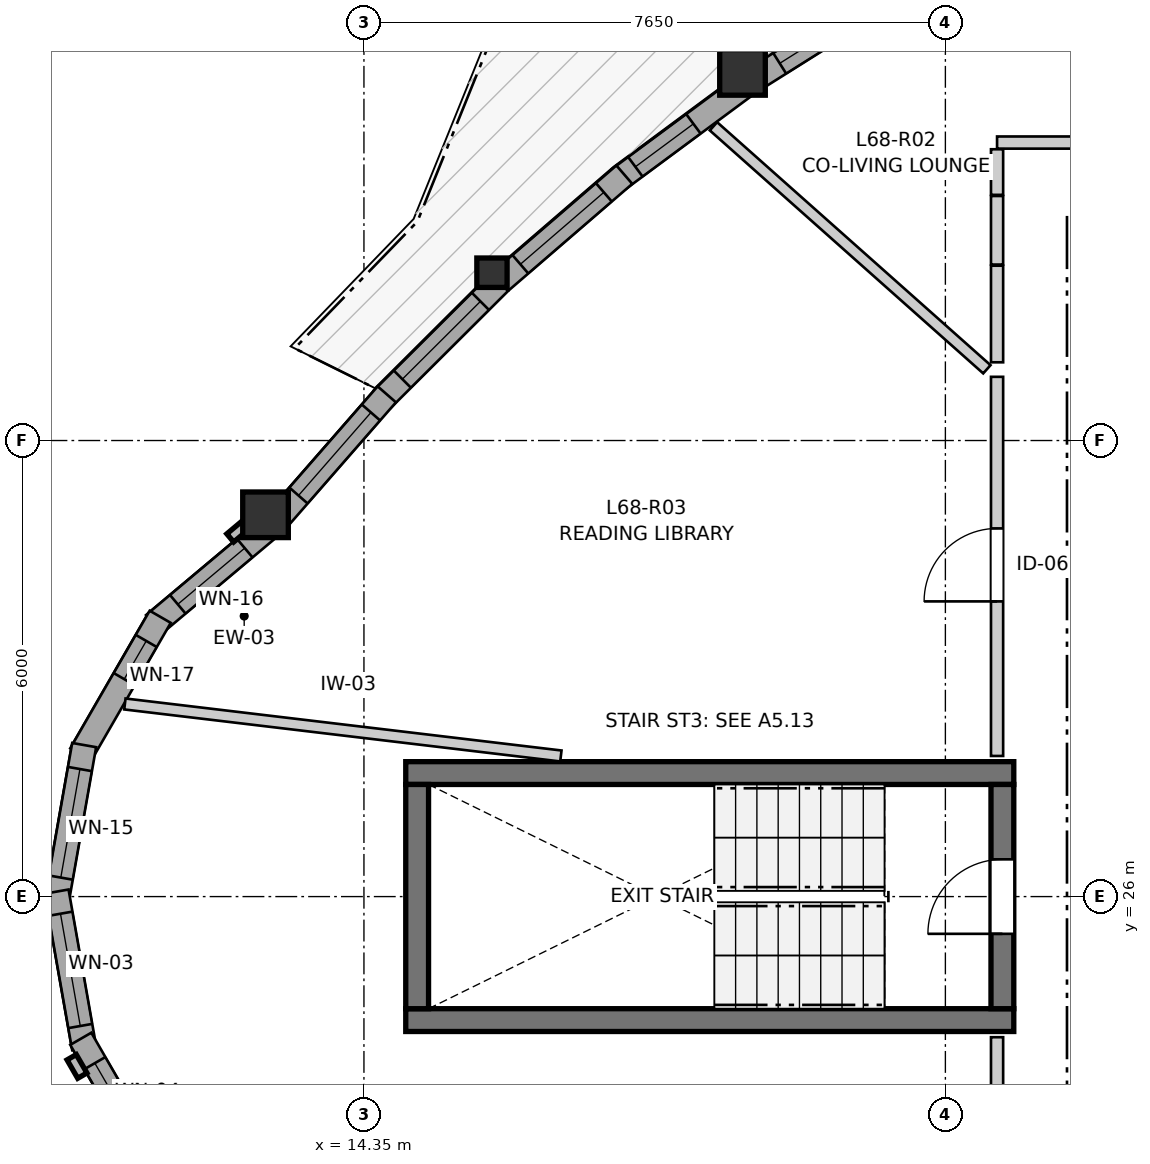
"""IFC4 building model, lengths in metres.
Left out: names, types, materials, properties, quantities, classifications, styles, units other than length and angle.
Written with IfcOpenShell. Run it as: python <this file> out.ifc"""

import sys

from ifc_helpers import new_model, si_unit, direction, frame, frame_2d, origin, origin_2d, place, context, subcontext, project, spatial, rectangle, i_section, extrude, source, transform, mapped, element, fill, save


model = new_model("IFC4")
c1 = context("Model", 3, precision=1e-05, world=origin(), true_north=direction((0.0, 1.0)))
c2 = subcontext(c1, "Body", "Model", "MODEL_VIEW")
j1 = project(units=[si_unit("LENGTHUNIT", "METRE"), si_unit("PLANEANGLEUNIT", "RADIAN")], contexts=[c1])
p1 = place(None, origin())
s1 = spatial("IfcSite", under=j1, at=p1, CompositionType="ELEMENT")
p2 = place(p1, origin())
s2 = spatial("IfcBuilding", under=s1, at=p2, CompositionType="ELEMENT")
p3 = place(p2, frame((0.0, 0.0, 227.6)))
s3 = spatial("IfcBuildingStorey", under=s2, at=p3, CompositionType="ELEMENT", Elevation=227.6)
for number, where, z_axis, x_axis in (
    (1, (14.9, 24.375, 0.0), (0.0, 0.0, 1.0), (1.0, 0.0, 0.0)),
    (2, (22.9, 27.625, 0.0), (0.0, 0.0, 1.0), (-1.0, 0.0, 0.0)),
):
    element("IfcWall", number, at=place(p3, frame(where, z_axis=z_axis, x_axis=x_axis)), inside=s3, PredefinedType="SHEAR", context=c2, shape_type="SweptSolid", body=[
        extrude(rectangle(XDim=8.0, YDim=0.3, at=frame_2d((4.0, 0.0))), origin(), (0.0, 0.0, 1.0), 2.96),
    ])
p4 = place(p3, frame((15.05, 27.475, 0.0), z_axis=(0.0, 0.0, 1.0), x_axis=(0.0, -1.0, 0.0)))
e3 = element("IfcWall", 3, at=p4, inside=s3, PredefinedType="SHEAR", context=c2, shape_type="SweptSolid", body=[
    extrude(rectangle(XDim=2.95, YDim=0.3, at=frame_2d((1.475, 0.0))), origin(), (0.0, 0.0, 1.0), 2.96),
])
p5 = place(p3, frame((22.75, 24.525, 0.0), z_axis=(0.0, 0.0, 1.0), x_axis=(0.0, 1.0, 0.0)))
e4 = element("IfcWall", 4, at=p5, inside=s3, PredefinedType="SHEAR", context=c2, shape_type="SweptSolid", body=[
    extrude(rectangle(XDim=2.95, YDim=0.3, at=frame_2d((1.475, 0.0))), origin(), (0.0, 0.0, 1.0), 2.96),
])
p6 = place(p5, frame((0.985, 0.0, 0.0)))
e5 = element("IfcOpeningElement", 5, at=p6, cuts=e4, PredefinedType="OPENING", context=c2, shape_type="SweptSolid", body=[
    extrude(rectangle(XDim=0.98, YDim=2.15, at=frame_2d((0.49, 1.075))), frame((0.0, 0.16, 0.0), z_axis=(0.0, -1.0, 0.0), x_axis=(1.0, 0.0, 0.0)), (0.0, 0.0, 1.0), 0.32),
])
m1 = source(origin(), c2, "Body", "SweptSolid", [
    extrude(rectangle(XDim=0.6, YDim=0.6, at=origin_2d()), origin(), (0.0, 0.0, 1.0), 2.96),
])
for number, where, z_axis, x_axis in (
    (6, (13.055, 31.023, 0.0), (0.0, 0.0, 1.0), (1.0, 0.0, 0.0)),
    (7, (19.331, 36.843, 0.0), (0.0, 0.0, 1.0), (1.0, 0.0, 0.0)),
):
    element("IfcColumn", number, at=place(p3, frame(where, z_axis=z_axis, x_axis=x_axis)), inside=s3, PredefinedType="COLUMN", context=c2, shape_type="MappedRepresentation", body=[
        mapped(m1, transform((0.0, 0.0, 0.0), x_axis=(1.0, 0.0, 0.0), y_axis=(0.0, 1.0, 0.0), z_axis=(0.0, 0.0, 1.0), scale=1.0)),
    ])
m2 = source(origin(), c2, "Body", "SweptSolid", [
    extrude(i_section(OverallWidth=0.398, OverallDepth=0.387, WebThickness=0.019, FlangeThickness=0.03, FilletRadius=0.015, at=origin_2d()), origin(), (0.0, 0.0, 1.0), 2.96),
])
p7 = place(p3, frame((16.034, 34.208, 0.0), z_axis=(0.0, 0.0, 1.0), x_axis=(1.0, 0.0, 0.0)))
e8 = element("IfcColumn", 8, at=p7, inside=s3, PredefinedType="PILASTER", context=c2, shape_type="MappedRepresentation", body=[
    mapped(m2, transform((0.0, 0.0, 0.0), x_axis=(1.0, 0.0, 0.0), y_axis=(0.0, 1.0, 0.0), z_axis=(0.0, 0.0, 1.0), scale=1.0)),
])
p8 = place(p3, frame((13.089, 30.843, 0.0), z_axis=(0.0, 0.0, 1.0), x_axis=(-0.76606505432, -0.642763045414, 0.0)))
e9 = element("IfcWall", 9, at=p8, inside=s3, PredefinedType="SOLIDWALL", context=c2, shape_type="SweptSolid", body=[
    extrude(rectangle(XDim=1.962, YDim=0.32, at=frame_2d((0.981, 0.0))), origin(), (0.0, 0.0, 1.0), 2.58),
])
p9 = place(p8, frame((0.401, 0.0, 0.82)))
e10 = element("IfcOpeningElement", 10, at=p9, cuts=e9, PredefinedType="OPENING", context=c2, shape_type="SweptSolid", body=[
    extrude(rectangle(XDim=1.15, YDim=1.2, at=frame_2d((0.575, 0.6))), frame((0.0, 0.17, 0.0), z_axis=(0.0, -1.0, 0.0), x_axis=(1.0, 0.0, 0.0)), (0.0, 0.0, 1.0), 0.34),
])
p10 = place(p3, frame((11.669, 29.681, 0.0), z_axis=(0.0, 0.0, 1.0), x_axis=(-0.49990781971, -0.866078617559, 0.0)))
e11 = element("IfcWall", 11, at=p10, inside=s3, PredefinedType="SOLIDWALL", context=c2, shape_type="SweptSolid", body=[
    extrude(rectangle(XDim=2.09, YDim=0.32, at=frame_2d((1.045, 0.0))), origin(), (0.0, 0.0, 1.0), 2.58),
])
p11 = place(p10, frame((0.367, 0.0, 0.82)))
e12 = element("IfcOpeningElement", 12, at=p11, cuts=e11, PredefinedType="OPENING", context=c2, shape_type="SweptSolid", body=[
    extrude(rectangle(XDim=0.58, YDim=1.35, at=frame_2d((0.29, 0.675))), frame((0.0, 0.17, 0.0), z_axis=(0.0, -1.0, 0.0), x_axis=(1.0, 0.0, 0.0)), (0.0, 0.0, 1.0), 0.34),
])
p12 = place(p3, frame((10.669, 27.993, 0.0), z_axis=(0.0, 0.0, 1.0), x_axis=(-0.173672066494, -0.984803540469, 0.0)))
e13 = element("IfcWall", 13, at=p12, inside=s3, PredefinedType="SOLIDWALL", context=c2, shape_type="SweptSolid", body=[
    extrude(rectangle(XDim=2.09, YDim=0.32, at=frame_2d((1.045, 0.0))), origin(), (0.0, 0.0, 1.0), 2.58),
])
p13 = place(p12, frame((0.32, 0.0, 0.82)))
e14 = element("IfcOpeningElement", 14, at=p13, cuts=e13, PredefinedType="OPENING", context=c2, shape_type="SweptSolid", body=[
    extrude(rectangle(XDim=1.45, YDim=1.25, at=frame_2d((0.725, 0.625))), frame((0.0, 0.17, 0.0), z_axis=(0.0, -1.0, 0.0), x_axis=(1.0, 0.0, 0.0)), (0.0, 0.0, 1.0), 0.34),
])
p14 = place(p3, frame((10.306, 26.065, 0.0), z_axis=(0.0, 0.0, 1.0), x_axis=(0.173672066494, -0.984803540469, 0.0)))
e15 = element("IfcWall", 15, at=p14, inside=s3, PredefinedType="SOLIDWALL", context=c2, shape_type="SweptSolid", body=[
    extrude(rectangle(XDim=2.09, YDim=0.32, at=frame_2d((1.045, 0.0))), origin(), (0.0, 0.0, 1.0), 2.58),
])
p15 = place(p14, frame((0.295, 0.0, 0.82)))
e16 = element("IfcOpeningElement", 16, at=p15, cuts=e15, PredefinedType="OPENING", context=c2, shape_type="SweptSolid", body=[
    extrude(rectangle(XDim=1.5, YDim=1.45, at=frame_2d((0.75, 0.725))), frame((0.0, 0.17, 0.0), z_axis=(0.0, -1.0, 0.0), x_axis=(1.0, 0.0, 0.0)), (0.0, 0.0, 1.0), 0.34),
])
p16 = place(p3, frame((10.625, 24.129, 0.0), z_axis=(0.0, 0.0, 1.0), x_axis=(0.49990781971, -0.866078617559, 0.0)))
e17 = element("IfcWall", 17, at=p16, inside=s3, PredefinedType="SOLIDWALL", context=c2, shape_type="SweptSolid", body=[
    extrude(rectangle(XDim=2.09, YDim=0.32, at=frame_2d((1.045, 0.0))), origin(), (0.0, 0.0, 1.0), 2.58),
])
p17 = place(p16, frame((0.37, 0.0, 0.82)))
e18 = element("IfcOpeningElement", 18, at=p17, cuts=e17, PredefinedType="OPENING", context=c2, shape_type="SweptSolid", body=[
    extrude(rectangle(XDim=1.35, YDim=1.45, at=frame_2d((0.675, 0.725))), frame((0.0, 0.17, 0.0), z_axis=(0.0, -1.0, 0.0), x_axis=(1.0, 0.0, 0.0)), (0.0, 0.0, 1.0), 0.34),
])
p18 = place(p3, frame((21.215, 37.84, 0.0), z_axis=(0.0, 0.0, 1.0), x_axis=(-0.846356989859, -0.532616039672, 0.0)))
e19 = element("IfcWall", 19, at=p18, inside=s3, PredefinedType="SOLIDWALL", context=c2, shape_type="SweptSolid", body=[
    extrude(rectangle(XDim=2.036, YDim=0.32, at=frame_2d((1.018, 0.0))), origin(), (0.0, 0.0, 1.0), 2.58),
])
p19 = place(p18, frame((0.398, 0.0, 0.82)))
e20 = element("IfcOpeningElement", 20, at=p19, cuts=e19, PredefinedType="OPENING", context=c2, shape_type="SweptSolid", body=[
    extrude(rectangle(XDim=1.25, YDim=1.35, at=frame_2d((0.625, 0.675))), frame((0.0, 0.17, 0.0), z_axis=(0.0, -1.0, 0.0), x_axis=(1.0, 0.0, 0.0)), (0.0, 0.0, 1.0), 0.34),
])
p20 = place(p3, frame((19.354, 36.661, 0.0), z_axis=(0.0, 0.0, 1.0), x_axis=(-0.803846460046, -0.59483684206, 0.0)))
e21 = element("IfcWall", 21, at=p20, inside=s3, PredefinedType="SOLIDWALL", context=c2, shape_type="SweptSolid", body=[
    extrude(rectangle(XDim=2.048, YDim=0.32, at=frame_2d((1.024, 0.0))), origin(), (0.0, 0.0, 1.0), 2.58),
])
p21 = place(p20, frame((0.832, 0.0, 0.82)))
e22 = element("IfcOpeningElement", 22, at=p21, cuts=e21, PredefinedType="OPENING", context=c2, shape_type="SweptSolid", body=[
    extrude(rectangle(XDim=0.95, YDim=1.35, at=frame_2d((0.475, 0.675))), frame((0.0, 0.17, 0.0), z_axis=(0.0, -1.0, 0.0), x_axis=(1.0, 0.0, 0.0)), (0.0, 0.0, 1.0), 0.34),
])
p22 = place(p3, frame((17.776, 35.498, 0.0), z_axis=(0.0, 0.0, 1.0), x_axis=(-0.757443010922, -0.652901282894, 0.0)))
e23 = element("IfcWall", 23, at=p22, inside=s3, PredefinedType="SOLIDWALL", context=c2, shape_type="SweptSolid", body=[
    extrude(rectangle(XDim=2.142, YDim=0.32, at=frame_2d((1.071, 0.0))), origin(), (0.0, 0.0, 1.0), 2.58),
])
p23 = place(p22, frame((0.356, 0.0, 0.82)))
e24 = element("IfcOpeningElement", 24, at=p23, cuts=e23, PredefinedType="OPENING", context=c2, shape_type="SweptSolid", body=[
    extrude(rectangle(XDim=1.45, YDim=1.25, at=frame_2d((0.725, 0.625))), frame((0.0, 0.17, 0.0), z_axis=(0.0, -1.0, 0.0), x_axis=(1.0, 0.0, 0.0)), (0.0, 0.0, 1.0), 0.34),
])
p24 = place(p3, frame((16.133, 34.08, 0.0), z_axis=(0.0, 0.0, 1.0), x_axis=(-0.708395431826, -0.705815777784, 0.0)))
e25 = element("IfcWall", 25, at=p24, inside=s3, PredefinedType="SOLIDWALL", context=c2, shape_type="SweptSolid", body=[
    extrude(rectangle(XDim=2.177, YDim=0.32, at=frame_2d((1.088, 0.0))), origin(), (0.0, 0.0, 1.0), 2.58),
])
p25 = place(p24, frame((0.354, 0.0, 0.82)))
e26 = element("IfcOpeningElement", 26, at=p25, cuts=e25, PredefinedType="OPENING", context=c2, shape_type="SweptSolid", body=[
    extrude(rectangle(XDim=1.45, YDim=1.25, at=frame_2d((0.725, 0.625))), frame((0.0, 0.17, 0.0), z_axis=(0.0, -1.0, 0.0), x_axis=(1.0, 0.0, 0.0)), (0.0, 0.0, 1.0), 0.34),
])
p26 = place(p3, frame((14.65, 32.607, 0.0), z_axis=(0.0, 0.0, 1.0), x_axis=(-0.657629046069, -0.753341912923, 0.0)))
e27 = element("IfcWall", 27, at=p26, inside=s3, PredefinedType="SOLIDWALL", context=c2, shape_type="SweptSolid", body=[
    extrude(rectangle(XDim=2.153, YDim=0.32, at=frame_2d((1.076, 0.0))), origin(), (0.0, 0.0, 1.0), 2.58),
])
p27 = place(p26, frame((0.316, 0.0, 0.82)))
e28 = element("IfcOpeningElement", 28, at=p27, cuts=e27, PredefinedType="OPENING", context=c2, shape_type="SweptSolid", body=[
    extrude(rectangle(XDim=1.45, YDim=1.25, at=frame_2d((0.725, 0.625))), frame((0.0, 0.17, 0.0), z_axis=(0.0, -1.0, 0.0), x_axis=(1.0, 0.0, 0.0)), (0.0, 0.0, 1.0), 0.34),
])
p28 = place(p3, frame((22.68, 17.653, 0.0), z_axis=(0.0, 0.0, 1.0), x_axis=(0.0, 1.0, 0.0)))
e29 = element("IfcWall", 29, at=p28, inside=s3, PredefinedType="PARTITIONING", context=c2, shape_type="SweptSolid", body=[
    extrude(rectangle(XDim=6.497, YDim=0.16, at=frame_2d((3.249, 0.0))), origin(), (0.0, 0.0, 1.0), 2.96),
])
p29 = place(p28, frame((2.796, 0.0, 0.0)))
e30 = element("IfcOpeningElement", 30, at=p29, cuts=e29, PredefinedType="OPENING", context=c2, shape_type="SweptSolid", body=[
    extrude(rectangle(XDim=0.96, YDim=2.1, at=frame_2d((0.48, 1.05))), frame((0.0, 0.09, 0.0), z_axis=(0.0, -1.0, 0.0), x_axis=(1.0, 0.0, 0.0)), (0.0, 0.0, 1.0), 0.18),
])
p30 = place(p3, frame((22.68, 27.85, 0.0), z_axis=(0.0, 0.0, 1.0), x_axis=(0.0, 1.0, 0.0)))
e31 = element("IfcWall", 31, at=p30, inside=s3, PredefinedType="PARTITIONING", context=c2, shape_type="SweptSolid", body=[
    extrude(rectangle(XDim=4.988, YDim=0.16, at=frame_2d((2.494, 0.0))), origin(), (0.0, 0.0, 1.0), 2.96),
])
p31 = place(p30, frame((2.033, 0.0, 0.0)))
e32 = element("IfcOpeningElement", 32, at=p31, cuts=e31, PredefinedType="OPENING", context=c2, shape_type="SweptSolid", body=[
    extrude(rectangle(XDim=0.96, YDim=2.1, at=frame_2d((0.48, 1.05))), frame((0.0, 0.09, 0.0), z_axis=(0.0, -1.0, 0.0), x_axis=(1.0, 0.0, 0.0)), (0.0, 0.0, 1.0), 0.18),
])
p32 = place(p3, frame((11.205, 28.534, 0.0), z_axis=(0.0, 0.0, 1.0), x_axis=(0.9929685345, -0.118378585449, 0.0)))
e33 = element("IfcWall", 33, at=p32, inside=s3, PredefinedType="PARTITIONING", context=c2, shape_type="SweptSolid", body=[
    extrude(rectangle(XDim=5.777, YDim=0.145, at=frame_2d((2.888, 0.0))), origin(), (0.0, 0.0, 1.0), 2.96),
])
p33 = place(p3, frame((18.949, 36.134, 0.0), z_axis=(0.0, 0.0, 1.0), x_axis=(0.747482088067, -0.664281964243, 0.0)))
e34 = element("IfcWall", 34, at=p33, inside=s3, PredefinedType="PARTITIONING", context=c2, shape_type="SweptSolid", body=[
    extrude(rectangle(XDim=4.812, YDim=0.145, at=frame_2d((2.406, 0.0))), origin(), (0.0, 0.0, 1.0), 2.96),
])
p34 = place(p3, frame((22.68, 33.029, 0.0), z_axis=(0.0, 0.0, 1.0), x_axis=(0.0, 1.0, 0.0)))
e35 = element("IfcWall", 35, at=p34, inside=s3, PredefinedType="PARTITIONING", context=c2, shape_type="SweptSolid", body=[
    extrude(rectangle(XDim=1.271, YDim=0.16, at=frame_2d((0.635, 0.0))), origin(), (0.0, 0.0, 1.0), 2.628),
])
p35 = place(p3, frame((22.68, 35.92, 0.0), z_axis=(0.0, 0.0, 1.0), x_axis=(1.0, 0.0, 0.0)))
e36 = element("IfcWall", 36, at=p35, inside=s3, PredefinedType="PARTITIONING", context=c2, shape_type="SweptSolid", body=[
    extrude(rectangle(XDim=1.332, YDim=0.16, at=frame_2d((0.666, 0.0))), origin(), (0.0, 0.0, 1.0), 2.96),
])
p36 = place(p3, frame((22.68, 34.315, 0.0), z_axis=(0.0, 0.0, 1.0), x_axis=(0.0, 1.0, 0.0)))
e37 = element("IfcWall", 37, at=p36, inside=s3, PredefinedType="PARTITIONING", context=c2, shape_type="SweptSolid", body=[
    extrude(rectangle(XDim=0.902, YDim=0.16, at=frame_2d((0.451, 0.0))), origin(), (0.0, 0.0, 1.0), 2.96),
])
p37 = place(p3, frame((22.68, 35.232, 0.0), z_axis=(0.0, 0.0, 1.0), x_axis=(0.0, 1.0, 0.0)))
e38 = element("IfcWall", 38, at=p37, inside=s3, PredefinedType="PARTITIONING", context=c2, shape_type="SweptSolid", body=[
    extrude(rectangle(XDim=0.6, YDim=0.16, at=frame_2d((0.3, 0.0))), origin(), (0.0, 0.0, 1.0), 2.96),
])
m3 = source(origin(), c2, "Body", "SweptSolid", [
    extrude(rectangle(XDim=1.15, YDim=1.2, at=frame_2d((0.575, 0.6))), frame((0.0, 0.03, 0.0), z_axis=(0.0, -1.0, 0.0), x_axis=(1.0, 0.0, 0.0)), (0.0, 0.0, 1.0), 0.06),
])
p38 = place(p9, origin())
e39 = element("IfcWindow", 39, at=p38, inside=s3, PartitioningType="SINGLE_PANEL", PredefinedType="WINDOW", context=c2, shape_type="MappedRepresentation", body=[
    mapped(m3, transform((0.0, 0.0, 0.0), x_axis=(1.0, 0.0, 0.0), y_axis=(0.0, 1.0, 0.0), z_axis=(0.0, 0.0, 1.0), scale=1.0)),
])
fill(e10, e39)
m4 = source(origin(), c2, "Body", "SweptSolid", [
    extrude(rectangle(XDim=0.58, YDim=1.35, at=frame_2d((0.29, 0.675))), frame((0.0, 0.03, 0.0), z_axis=(0.0, -1.0, 0.0), x_axis=(1.0, 0.0, 0.0)), (0.0, 0.0, 1.0), 0.06),
])
p39 = place(p11, origin())
e40 = element("IfcWindow", 40, at=p39, inside=s3, PartitioningType="SINGLE_PANEL", PredefinedType="WINDOW", context=c2, shape_type="MappedRepresentation", body=[
    mapped(m4, transform((0.0, 0.0, 0.0), x_axis=(1.0, 0.0, 0.0), y_axis=(0.0, 1.0, 0.0), z_axis=(0.0, 0.0, 1.0), scale=1.0)),
])
fill(e12, e40)
m5 = source(origin(), c2, "Body", "SweptSolid", [
    extrude(rectangle(XDim=1.45, YDim=1.25, at=frame_2d((0.725, 0.625))), frame((0.0, 0.03, 0.0), z_axis=(0.0, -1.0, 0.0), x_axis=(1.0, 0.0, 0.0)), (0.0, 0.0, 1.0), 0.06),
])
p40 = place(p13, origin())
e41 = element("IfcWindow", 41, at=p40, inside=s3, PartitioningType="SINGLE_PANEL", PredefinedType="WINDOW", context=c2, shape_type="MappedRepresentation", body=[
    mapped(m5, transform((0.0, 0.0, 0.0), x_axis=(1.0, 0.0, 0.0), y_axis=(0.0, 1.0, 0.0), z_axis=(0.0, 0.0, 1.0), scale=1.0)),
])
fill(e14, e41)
m6 = source(origin(), c2, "Body", "SweptSolid", [
    extrude(rectangle(XDim=1.5, YDim=1.45, at=frame_2d((0.75, 0.725))), frame((0.0, 0.03, 0.0), z_axis=(0.0, -1.0, 0.0), x_axis=(1.0, 0.0, 0.0)), (0.0, 0.0, 1.0), 0.06),
])
p41 = place(p15, origin())
e42 = element("IfcWindow", 42, at=p41, inside=s3, PartitioningType="SINGLE_PANEL", PredefinedType="WINDOW", context=c2, shape_type="MappedRepresentation", body=[
    mapped(m6, transform((0.0, 0.0, 0.0), x_axis=(1.0, 0.0, 0.0), y_axis=(0.0, 1.0, 0.0), z_axis=(0.0, 0.0, 1.0), scale=1.0)),
])
fill(e16, e42)
m7 = source(origin(), c2, "Body", "SweptSolid", [
    extrude(rectangle(XDim=1.35, YDim=1.45, at=frame_2d((0.675, 0.725))), frame((0.0, 0.03, 0.0), z_axis=(0.0, -1.0, 0.0), x_axis=(1.0, 0.0, 0.0)), (0.0, 0.0, 1.0), 0.06),
])
p42 = place(p17, origin())
e43 = element("IfcWindow", 43, at=p42, inside=s3, PartitioningType="SINGLE_PANEL", PredefinedType="WINDOW", context=c2, shape_type="MappedRepresentation", body=[
    mapped(m7, transform((0.0, 0.0, 0.0), x_axis=(1.0, 0.0, 0.0), y_axis=(0.0, 1.0, 0.0), z_axis=(0.0, 0.0, 1.0), scale=1.0)),
])
fill(e18, e43)
m8 = source(origin(), c2, "Body", "SweptSolid", [
    extrude(rectangle(XDim=1.25, YDim=1.35, at=frame_2d((0.625, 0.675))), frame((0.0, 0.03, 0.0), z_axis=(0.0, -1.0, 0.0), x_axis=(1.0, 0.0, 0.0)), (0.0, 0.0, 1.0), 0.06),
])
p43 = place(p19, origin())
e44 = element("IfcWindow", 44, at=p43, inside=s3, PartitioningType="SINGLE_PANEL", PredefinedType="WINDOW", context=c2, shape_type="MappedRepresentation", body=[
    mapped(m8, transform((0.0, 0.0, 0.0), x_axis=(1.0, 0.0, 0.0), y_axis=(0.0, 1.0, 0.0), z_axis=(0.0, 0.0, 1.0), scale=1.0)),
])
fill(e20, e44)
m9 = source(origin(), c2, "Body", "SweptSolid", [
    extrude(rectangle(XDim=0.95, YDim=1.35, at=frame_2d((0.475, 0.675))), frame((0.0, 0.03, 0.0), z_axis=(0.0, -1.0, 0.0), x_axis=(1.0, 0.0, 0.0)), (0.0, 0.0, 1.0), 0.06),
])
p44 = place(p21, origin())
e45 = element("IfcWindow", 45, at=p44, inside=s3, PartitioningType="SINGLE_PANEL", PredefinedType="WINDOW", context=c2, shape_type="MappedRepresentation", body=[
    mapped(m9, transform((0.0, 0.0, 0.0), x_axis=(1.0, 0.0, 0.0), y_axis=(0.0, 1.0, 0.0), z_axis=(0.0, 0.0, 1.0), scale=1.0)),
])
fill(e22, e45)
p45 = place(p23, origin())
e46 = element("IfcWindow", 46, at=p45, inside=s3, PartitioningType="SINGLE_PANEL", PredefinedType="WINDOW", context=c2, shape_type="MappedRepresentation", body=[
    mapped(m5, transform((0.0, 0.0, 0.0), x_axis=(1.0, 0.0, 0.0), y_axis=(0.0, 1.0, 0.0), z_axis=(0.0, 0.0, 1.0), scale=1.0)),
])
fill(e24, e46)
p46 = place(p25, origin())
e47 = element("IfcWindow", 47, at=p46, inside=s3, PartitioningType="SINGLE_PANEL", PredefinedType="WINDOW", context=c2, shape_type="MappedRepresentation", body=[
    mapped(m5, transform((0.0, 0.0, 0.0), x_axis=(1.0, 0.0, 0.0), y_axis=(0.0, 1.0, 0.0), z_axis=(0.0, 0.0, 1.0), scale=1.0)),
])
fill(e26, e47)
p47 = place(p27, origin())
e48 = element("IfcWindow", 48, at=p47, inside=s3, PartitioningType="SINGLE_PANEL", PredefinedType="WINDOW", context=c2, shape_type="MappedRepresentation", body=[
    mapped(m5, transform((0.0, 0.0, 0.0), x_axis=(1.0, 0.0, 0.0), y_axis=(0.0, 1.0, 0.0), z_axis=(0.0, 0.0, 1.0), scale=1.0)),
])
fill(e28, e48)
m10 = source(origin(), c2, "Body", "SweptSolid", [
    extrude(rectangle(XDim=0.98, YDim=2.15, at=frame_2d((0.49, 1.075))), frame((0.0, 0.025, 0.0), z_axis=(0.0, -1.0, 0.0), x_axis=(1.0, 0.0, 0.0)), (0.0, 0.0, 1.0), 0.05),
])
p48 = place(p6, origin())
e49 = element("IfcDoor", 49, at=p48, inside=s3, OperationType="SINGLE_SWING_LEFT", PredefinedType="DOOR", context=c2, shape_type="MappedRepresentation", body=[
    mapped(m10, transform((0.0, 0.0, 0.0), x_axis=(1.0, 0.0, 0.0), y_axis=(0.0, 1.0, 0.0), z_axis=(0.0, 0.0, 1.0), scale=1.0)),
])
fill(e5, e49)
m11 = source(origin(), c2, "Body", "SweptSolid", [
    extrude(rectangle(XDim=0.96, YDim=2.1, at=frame_2d((0.48, 1.05))), frame((0.0, 0.025, 0.0), z_axis=(0.0, -1.0, 0.0), x_axis=(1.0, 0.0, 0.0)), (0.0, 0.0, 1.0), 0.05),
])
p49 = place(p31, origin())
e50 = element("IfcDoor", 50, at=p49, inside=s3, OperationType="SINGLE_SWING_LEFT", PredefinedType="DOOR", context=c2, shape_type="MappedRepresentation", body=[
    mapped(m11, transform((0.0, 0.0, 0.0), x_axis=(1.0, 0.0, 0.0), y_axis=(0.0, 1.0, 0.0), z_axis=(0.0, 0.0, 1.0), scale=1.0)),
])
fill(e32, e50)
save(model, sys.argv[1])
